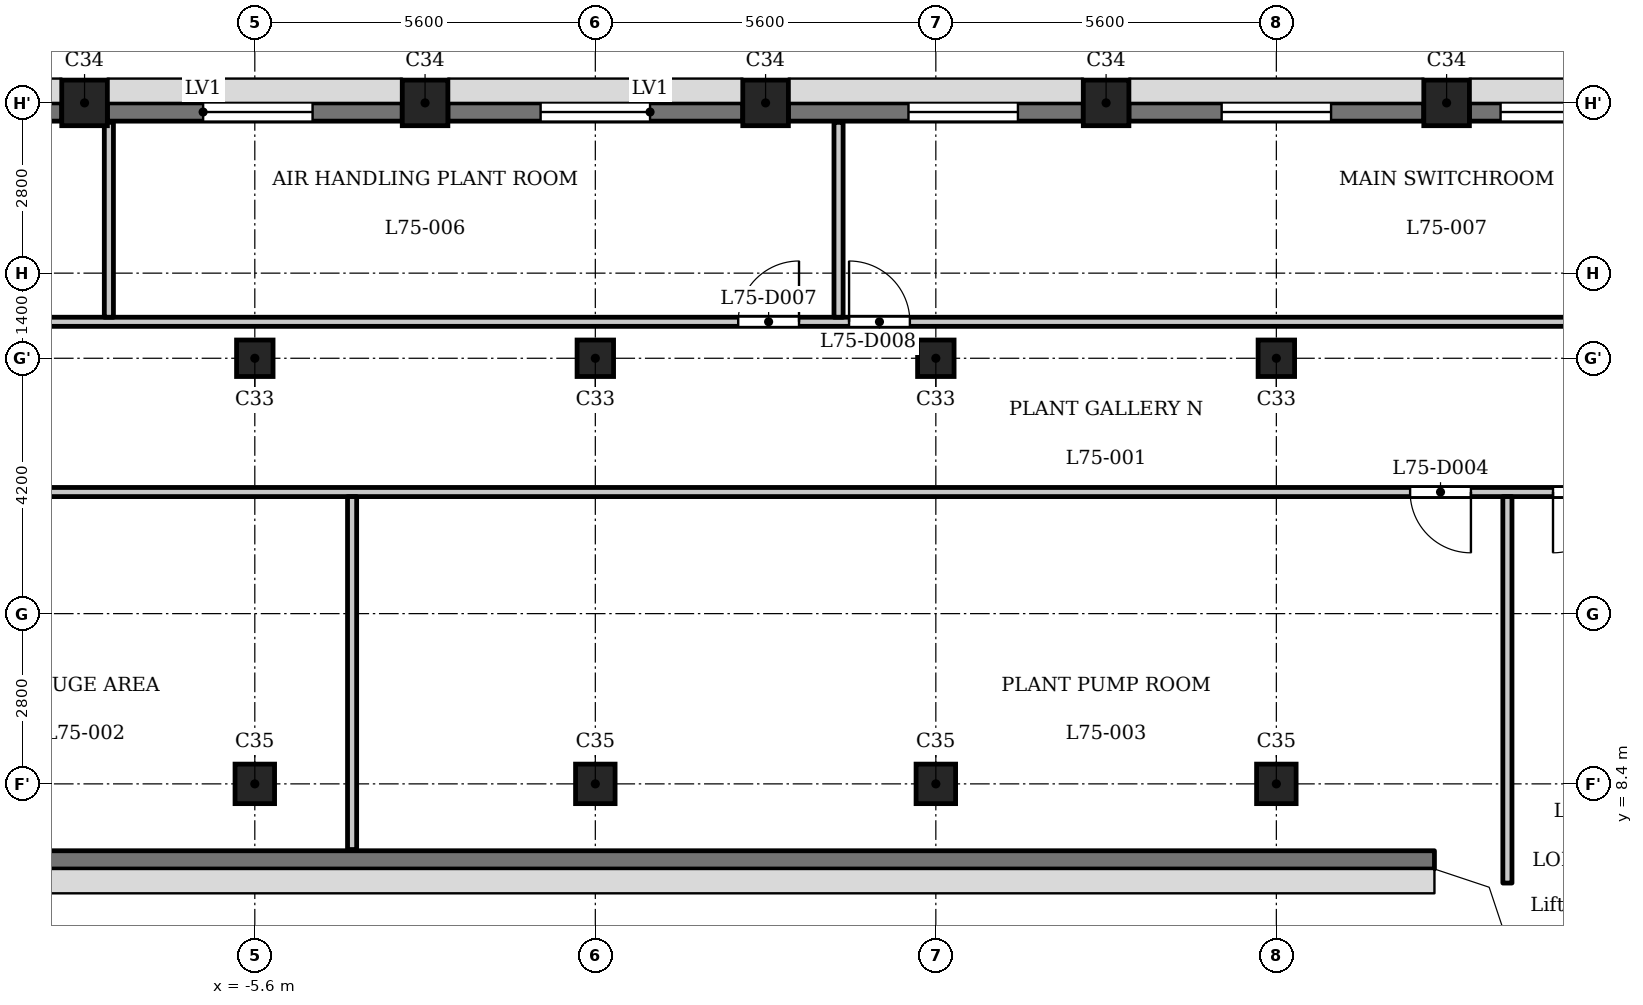
"""IFC4 building model, lengths in metres.
Left out: names, types, materials, properties, quantities, classifications, styles, units other than length and angle.
Written with IfcOpenShell. Run it as: python <this file> out.ifc"""

import sys

from ifc_helpers import new_model, si_unit, direction, frame, frame_2d, origin, origin_2d, place, context, subcontext, project, spatial, polyline, rectangle, outline, extrude, element, fill, save


model = new_model("IFC4")
c1 = context("Model", 3, precision=1e-05, world=origin(), true_north=direction((0.0, 1.0)))
c2 = subcontext(c1, "Body", "Model", "MODEL_VIEW")
j1 = project(units=[si_unit("LENGTHUNIT", "METRE"), si_unit("PLANEANGLEUNIT", "RADIAN")], contexts=[c1])
p1 = place(None, origin())
s1 = spatial("IfcSite", under=j1, at=p1, CompositionType="ELEMENT")
p2 = place(p1, origin())
s2 = spatial("IfcBuilding", under=s1, at=p2, CompositionType="ELEMENT")
p3 = place(p2, frame((0.0, 0.0, 289.1)))
s3 = spatial("IfcBuildingStorey", under=s2, at=p3, CompositionType="ELEMENT", Elevation=289.1)
for number, where, z_axis, x_axis in (
    (1, (14.0, 19.6, 0.0), (0.0, 0.0, 1.0), (1.0, 0.0, 0.0)),
    (2, (8.4, 19.6, 0.0), (0.0, 0.0, 1.0), (1.0, 0.0, 0.0)),
    (3, (2.8, 19.6, 0.0), (0.0, 0.0, 1.0), (1.0, 0.0, 0.0)),
    (4, (-2.8, 19.6, 0.0), (0.0, 0.0, 1.0), (1.0, 0.0, 0.0)),
    (5, (-8.4, 19.6, 0.0), (0.0, 0.0, 1.0), (1.0, 0.0, 0.0)),
):
    element("IfcColumn", number, at=place(p3, frame(where, z_axis=z_axis, x_axis=x_axis)), inside=s3, PredefinedType="COLUMN", context=c2, shape_type="SweptSolid", body=[
        extrude(rectangle(XDim=0.75, YDim=0.75, at=origin_2d()), origin(), (0.0, 0.0, 1.0), 5.4),
    ])
for number, where, z_axis, x_axis in (
    (6, (-5.6, 8.4, 0.0), (0.0, 0.0, 1.0), (1.0, 0.0, 0.0)),
    (7, (0.0, 8.4, 0.0), (0.0, 0.0, 1.0), (1.0, 0.0, 0.0)),
    (8, (5.6, 8.4, 0.0), (0.0, 0.0, 1.0), (1.0, 0.0, 0.0)),
    (9, (11.2, 8.4, 0.0), (0.0, 0.0, 1.0), (1.0, 0.0, 0.0)),
):
    element("IfcColumn", number, at=place(p3, frame(where, z_axis=z_axis, x_axis=x_axis)), inside=s3, PredefinedType="COLUMN", context=c2, shape_type="SweptSolid", body=[
        extrude(rectangle(XDim=0.65, YDim=0.65, at=origin_2d()), origin(), (0.0, 0.0, 1.0), 5.4),
    ])
for number, where, z_axis, x_axis in (
    (10, (-5.6, 15.4, 0.0), (0.0, 0.0, 1.0), (1.0, 0.0, 0.0)),
    (11, (0.0, 15.4, 0.0), (0.0, 0.0, 1.0), (1.0, 0.0, 0.0)),
    (12, (5.6, 15.4, 0.0), (0.0, 0.0, 1.0), (1.0, 0.0, 0.0)),
    (13, (11.2, 15.4, 0.0), (0.0, 0.0, 1.0), (1.0, 0.0, 0.0)),
):
    element("IfcColumn", number, at=place(p3, frame(where, z_axis=z_axis, x_axis=x_axis)), inside=s3, PredefinedType="COLUMN", context=c2, shape_type="SweptSolid", body=[
        extrude(rectangle(XDim=0.6, YDim=0.6, at=origin_2d()), origin(), (0.0, 0.0, 1.0), 5.4),
    ])
p4 = place(p3, frame((17.2, 19.45, 0.0), z_axis=(0.0, 0.0, 1.0), x_axis=(-1.0, 0.0, 0.0)))
e14 = element("IfcWall", 14, at=p4, inside=s3, PredefinedType="SOLIDWALL", context=c2, shape_type="SweptSolid", body=[
    extrude(rectangle(XDim=2.825, YDim=0.3, at=frame_2d((1.413, 0.0))), origin(), (0.0, 0.0, 1.0), 3.2),
])
p5 = place(p4, frame((0.512, 0.0, 0.9)))
e15 = element("IfcOpeningElement", 15, at=p5, cuts=e14, PredefinedType="OPENING", context=c2, shape_type="SweptSolid", body=[
    extrude(rectangle(XDim=1.8, YDim=1.5, at=frame_2d((0.9, 0.75))), frame((0.0, 0.16, 0.0), z_axis=(0.0, -1.0, 0.0), x_axis=(1.0, 0.0, 0.0)), (0.0, 0.0, 1.0), 0.32),
])
p6 = place(p3, frame((13.625, 19.45, 0.0), z_axis=(0.0, 0.0, 1.0), x_axis=(-1.0, 0.0, 0.0)))
e16 = element("IfcWall", 16, at=p6, inside=s3, PredefinedType="SOLIDWALL", context=c2, shape_type="SweptSolid", body=[
    extrude(rectangle(XDim=4.85, YDim=0.3, at=frame_2d((2.425, 0.0))), origin(), (0.0, 0.0, 1.0), 3.2),
])
p7 = place(p6, frame((1.525, 0.0, 0.9)))
e17 = element("IfcOpeningElement", 17, at=p7, cuts=e16, PredefinedType="OPENING", context=c2, shape_type="SweptSolid", body=[
    extrude(rectangle(XDim=1.8, YDim=1.5, at=frame_2d((0.9, 0.75))), frame((0.0, 0.16, 0.0), z_axis=(0.0, -1.0, 0.0), x_axis=(1.0, 0.0, 0.0)), (0.0, 0.0, 1.0), 0.32),
])
p8 = place(p3, frame((8.025, 19.45, 0.0), z_axis=(0.0, 0.0, 1.0), x_axis=(-1.0, 0.0, 0.0)))
e18 = element("IfcWall", 18, at=p8, inside=s3, PredefinedType="SOLIDWALL", context=c2, shape_type="SweptSolid", body=[
    extrude(rectangle(XDim=4.85, YDim=0.3, at=frame_2d((2.425, 0.0))), origin(), (0.0, 0.0, 1.0), 3.2),
])
p9 = place(p8, frame((1.075, 0.0, 0.9)))
e19 = element("IfcOpeningElement", 19, at=p9, cuts=e18, PredefinedType="OPENING", context=c2, shape_type="SweptSolid", body=[
    extrude(rectangle(XDim=1.8, YDim=1.5, at=frame_2d((0.9, 0.75))), frame((0.0, 0.16, 0.0), z_axis=(0.0, -1.0, 0.0), x_axis=(1.0, 0.0, 0.0)), (0.0, 0.0, 1.0), 0.32),
])
p10 = place(p3, frame((2.425, 19.45, 0.0), z_axis=(0.0, 0.0, 1.0), x_axis=(-1.0, 0.0, 0.0)))
e20 = element("IfcWall", 20, at=p10, inside=s3, PredefinedType="SOLIDWALL", context=c2, shape_type="SweptSolid", body=[
    extrude(rectangle(XDim=4.85, YDim=0.3, at=frame_2d((2.425, 0.0))), origin(), (0.0, 0.0, 1.0), 3.2),
])
p11 = place(p10, frame((1.525, 0.0, 0.9)))
e21 = element("IfcOpeningElement", 21, at=p11, cuts=e20, PredefinedType="OPENING", context=c2, shape_type="SweptSolid", body=[
    extrude(rectangle(XDim=1.8, YDim=1.5, at=frame_2d((0.9, 0.75))), frame((0.0, 0.16, 0.0), z_axis=(0.0, -1.0, 0.0), x_axis=(1.0, 0.0, 0.0)), (0.0, 0.0, 1.0), 0.32),
])
p12 = place(p3, frame((-3.175, 19.45, 0.0), z_axis=(0.0, 0.0, 1.0), x_axis=(-1.0, 0.0, 0.0)))
e22 = element("IfcWall", 22, at=p12, inside=s3, PredefinedType="SOLIDWALL", context=c2, shape_type="SweptSolid", body=[
    extrude(rectangle(XDim=4.85, YDim=0.3, at=frame_2d((2.425, 0.0))), origin(), (0.0, 0.0, 1.0), 3.2),
])
p13 = place(p12, frame((1.475, 0.0, 0.9)))
e23 = element("IfcOpeningElement", 23, at=p13, cuts=e22, PredefinedType="OPENING", context=c2, shape_type="SweptSolid", body=[
    extrude(rectangle(XDim=1.8, YDim=1.5, at=frame_2d((0.9, 0.75))), frame((0.0, 0.16, 0.0), z_axis=(0.0, -1.0, 0.0), x_axis=(1.0, 0.0, 0.0)), (0.0, 0.0, 1.0), 0.32),
])
p14 = place(p3, frame((-8.775, 19.45, 0.0), z_axis=(0.0, 0.0, 1.0), x_axis=(-1.0, 0.0, 0.0)))
e24 = element("IfcWall", 24, at=p14, inside=s3, PredefinedType="SOLIDWALL", context=c2, shape_type="SweptSolid", body=[
    extrude(rectangle(XDim=4.85, YDim=0.3, at=frame_2d((2.425, 0.0))), origin(), (0.0, 0.0, 1.0), 3.2),
])
p15 = place(p14, frame((1.525, 0.0, 0.9)))
e25 = element("IfcOpeningElement", 25, at=p15, cuts=e24, PredefinedType="OPENING", context=c2, shape_type="SweptSolid", body=[
    extrude(rectangle(XDim=1.8, YDim=1.5, at=frame_2d((0.9, 0.75))), frame((0.0, 0.16, 0.0), z_axis=(0.0, -1.0, 0.0), x_axis=(1.0, 0.0, 0.0)), (0.0, 0.0, 1.0), 0.32),
])
p16 = place(p3, frame((-13.8, 7.15, 0.0), z_axis=(0.0, 0.0, 1.0), x_axis=(1.0, 0.0, 0.0)))
e26 = element("IfcWall", 26, at=p16, inside=s3, PredefinedType="SOLIDWALL", context=c2, shape_type="SweptSolid", body=[
    extrude(rectangle(XDim=27.6, YDim=0.3, at=frame_2d((13.8, 0.0))), origin(), (0.0, 0.0, 1.0), 5.0),
])
p17 = place(p3, frame((-17.4, 13.2, 0.0), z_axis=(0.0, 0.0, 1.0), x_axis=(1.0, 0.0, 0.0)))
e27 = element("IfcWall", 27, at=p17, inside=s3, PredefinedType="PARTITIONING", context=c2, shape_type="SweptSolid", body=[
    extrude(rectangle(XDim=34.8, YDim=0.15, at=frame_2d((17.4, 0.0))), origin(), (0.0, 0.0, 1.0), 5.0),
])
p18 = place(p17, frame((0.75, 0.0, 0.0)))
e28 = element("IfcOpeningElement", 28, at=p18, cuts=e27, PredefinedType="OPENING", context=c2, shape_type="SweptSolid", body=[
    extrude(rectangle(XDim=1.0, YDim=2.1, at=frame_2d((0.5, 1.05))), frame((0.0, 0.085, 0.0), z_axis=(0.0, -1.0, 0.0), x_axis=(1.0, 0.0, 0.0)), (0.0, 0.0, 1.0), 0.17),
])
p19 = place(p17, frame((33.15, 0.0, 0.0)))
e29 = element("IfcOpeningElement", 29, at=p19, cuts=e27, PredefinedType="OPENING", context=c2, shape_type="SweptSolid", body=[
    extrude(rectangle(XDim=1.0, YDim=2.1, at=frame_2d((0.5, 1.05))), frame((0.0, 0.085, 0.0), z_axis=(0.0, -1.0, 0.0), x_axis=(1.0, 0.0, 0.0)), (0.0, 0.0, 1.0), 0.17),
])
p20 = place(p17, frame((3.05, 0.0, 0.0)))
e30 = element("IfcOpeningElement", 30, at=p20, cuts=e27, PredefinedType="OPENING", context=c2, shape_type="SweptSolid", body=[
    extrude(rectangle(XDim=1.2, YDim=2.1, at=frame_2d((0.6, 1.05))), frame((0.0, 0.085, 0.0), z_axis=(0.0, -1.0, 0.0), x_axis=(1.0, 0.0, 0.0)), (0.0, 0.0, 1.0), 0.17),
])
p21 = place(p17, frame((30.8, 0.0, 0.0)))
e31 = element("IfcOpeningElement", 31, at=p21, cuts=e27, PredefinedType="OPENING", context=c2, shape_type="SweptSolid", body=[
    extrude(rectangle(XDim=1.0, YDim=2.1, at=frame_2d((0.5, 1.05))), frame((0.0, 0.085, 0.0), z_axis=(0.0, -1.0, 0.0), x_axis=(1.0, 0.0, 0.0)), (0.0, 0.0, 1.0), 0.17),
])
p22 = place(p3, frame((-22.756, 16.0, 0.0), z_axis=(0.0, 0.0, 1.0), x_axis=(1.0, 0.0, 0.0)))
e32 = element("IfcWall", 32, at=p22, inside=s3, PredefinedType="PARTITIONING", context=c2, shape_type="SweptSolid", body=[
    extrude(rectangle(XDim=45.511, YDim=0.15, at=frame_2d((22.756, 0.0))), origin(), (0.0, 0.0, 1.0), 5.0),
])
p23 = place(p22, frame((2.106, 0.0, 0.0)))
e33 = element("IfcOpeningElement", 33, at=p23, cuts=e32, PredefinedType="OPENING", context=c2, shape_type="SweptSolid", body=[
    extrude(rectangle(XDim=1.0, YDim=2.1, at=frame_2d((0.5, 1.05))), frame((0.0, 0.085, 0.0), z_axis=(0.0, -1.0, 0.0), x_axis=(1.0, 0.0, 0.0)), (0.0, 0.0, 1.0), 0.17),
])
p24 = place(p22, frame((4.356, 0.0, 0.0)))
e34 = element("IfcOpeningElement", 34, at=p24, cuts=e32, PredefinedType="OPENING", context=c2, shape_type="SweptSolid", body=[
    extrude(rectangle(XDim=1.0, YDim=2.1, at=frame_2d((0.5, 1.05))), frame((0.0, 0.085, 0.0), z_axis=(0.0, -1.0, 0.0), x_axis=(1.0, 0.0, 0.0)), (0.0, 0.0, 1.0), 0.17),
])
p25 = place(p22, frame((25.106, 0.0, 0.0)))
e35 = element("IfcOpeningElement", 35, at=p25, cuts=e32, PredefinedType="OPENING", context=c2, shape_type="SweptSolid", body=[
    extrude(rectangle(XDim=1.0, YDim=2.1, at=frame_2d((0.5, 1.05))), frame((0.0, 0.085, 0.0), z_axis=(0.0, -1.0, 0.0), x_axis=(1.0, 0.0, 0.0)), (0.0, 0.0, 1.0), 0.17),
])
p26 = place(p22, frame((26.929, 0.0, 0.0)))
e36 = element("IfcOpeningElement", 36, at=p26, cuts=e32, PredefinedType="OPENING", context=c2, shape_type="SweptSolid", body=[
    extrude(rectangle(XDim=1.0, YDim=2.1, at=frame_2d((0.5, 1.05))), frame((0.0, 0.085, 0.0), z_axis=(0.0, -1.0, 0.0), x_axis=(1.0, 0.0, 0.0)), (0.0, 0.0, 1.0), 0.17),
])
p27 = place(p3, frame((-8.0, 16.075, 0.0), z_axis=(0.0, 0.0, 1.0), x_axis=(0.0, 1.0, 0.0)))
e37 = element("IfcWall", 37, at=p27, inside=s3, PredefinedType="PARTITIONING", context=c2, shape_type="SweptSolid", body=[
    extrude(rectangle(XDim=3.205, YDim=0.15, at=frame_2d((1.603, 0.0))), origin(), (0.0, 0.0, 1.0), 5.0),
])
p28 = place(p3, frame((-4.0, 7.32, 0.0), z_axis=(0.0, 0.0, 1.0), x_axis=(0.0, 1.0, 0.0)))
e38 = element("IfcWall", 38, at=p28, inside=s3, PredefinedType="PARTITIONING", context=c2, shape_type="SweptSolid", body=[
    extrude(rectangle(XDim=5.805, YDim=0.15, at=frame_2d((2.902, 0.0))), origin(), (0.0, 0.0, 1.0), 5.0),
])
p29 = place(p3, frame((4.0, 16.075, 0.0), z_axis=(0.0, 0.0, 1.0), x_axis=(0.0, 1.0, 0.0)))
e39 = element("IfcWall", 39, at=p29, inside=s3, PredefinedType="PARTITIONING", context=c2, shape_type="SweptSolid", body=[
    extrude(rectangle(XDim=3.205, YDim=0.15, at=frame_2d((1.603, 0.0))), origin(), (0.0, 0.0, 1.0), 5.0),
])
p30 = place(p3, frame((15.0, 6.769, 0.0), z_axis=(0.0, 0.0, 1.0), x_axis=(0.0, 1.0, 0.0)))
e40 = element("IfcWall", 40, at=p30, inside=s3, PredefinedType="PARTITIONING", context=c2, shape_type="SweptSolid", body=[
    extrude(rectangle(XDim=6.356, YDim=0.15, at=frame_2d((3.178, 0.0))), origin(), (0.0, 0.0, 1.0), 5.0),
])
p31 = place(p3, origin())
e41 = element("IfcWall", 41, at=p31, inside=s3, PredefinedType="SOLIDWALL", context=c2, shape_type="SweptSolid", body=[
    extrude(outline(polyline([(14.937, 6.937), (13.849, 7.3), (13.8, 7.3), (13.8, 7.0), (14.7, 6.7), (15.0, 5.8), (15.3, 5.8), (15.3, 5.849), (14.937, 6.937)])), origin(), (0.0, 0.0, 1.0), 5.0),
])
p32 = place(p19, origin())
e42 = element("IfcDoor", 42, at=p32, inside=s3, OperationType="SINGLE_SWING_LEFT", PredefinedType="DOOR", context=c2, shape_type="SweptSolid", body=[
    extrude(rectangle(XDim=1.0, YDim=2.1, at=frame_2d((0.5, 1.05))), frame((0.0, 0.025, 0.0), z_axis=(0.0, -1.0, 0.0), x_axis=(1.0, 0.0, 0.0)), (0.0, 0.0, 1.0), 0.05),
])
fill(e29, e42)
p33 = place(p21, origin())
e43 = element("IfcDoor", 43, at=p33, inside=s3, OperationType="SINGLE_SWING_RIGHT", PredefinedType="DOOR", context=c2, shape_type="SweptSolid", body=[
    extrude(rectangle(XDim=1.0, YDim=2.1, at=frame_2d((0.5, 1.05))), frame((0.0, 0.025, 0.0), z_axis=(0.0, -1.0, 0.0), x_axis=(1.0, 0.0, 0.0)), (0.0, 0.0, 1.0), 0.05),
])
fill(e31, e43)
p34 = place(p25, origin())
e44 = element("IfcDoor", 44, at=p34, inside=s3, OperationType="SINGLE_SWING_LEFT", PredefinedType="DOOR", context=c2, shape_type="SweptSolid", body=[
    extrude(rectangle(XDim=1.0, YDim=2.1, at=frame_2d((0.5, 1.05))), frame((0.0, 0.025, 0.0), z_axis=(0.0, -1.0, 0.0), x_axis=(1.0, 0.0, 0.0)), (0.0, 0.0, 1.0), 0.05),
])
fill(e35, e44)
p35 = place(p26, origin())
e45 = element("IfcDoor", 45, at=p35, inside=s3, OperationType="SINGLE_SWING_RIGHT", PredefinedType="DOOR", context=c2, shape_type="SweptSolid", body=[
    extrude(rectangle(XDim=1.0, YDim=2.1, at=frame_2d((0.5, 1.05))), frame((0.0, 0.025, 0.0), z_axis=(0.0, -1.0, 0.0), x_axis=(1.0, 0.0, 0.0)), (0.0, 0.0, 1.0), 0.05),
])
fill(e36, e45)
p36 = place(p5, origin())
e46 = element("IfcWindow", 46, at=p36, inside=s3, PartitioningType="SINGLE_PANEL", PredefinedType="WINDOW", context=c2, shape_type="SweptSolid", body=[
    extrude(rectangle(XDim=1.8, YDim=1.5, at=frame_2d((0.9, 0.75))), frame((0.0, 0.03, 0.0), z_axis=(0.0, -1.0, 0.0), x_axis=(1.0, 0.0, 0.0)), (0.0, 0.0, 1.0), 0.06),
])
fill(e15, e46)
p37 = place(p7, origin())
e47 = element("IfcWindow", 47, at=p37, inside=s3, PartitioningType="SINGLE_PANEL", PredefinedType="WINDOW", context=c2, shape_type="SweptSolid", body=[
    extrude(rectangle(XDim=1.8, YDim=1.5, at=frame_2d((0.9, 0.75))), frame((0.0, 0.03, 0.0), z_axis=(0.0, -1.0, 0.0), x_axis=(1.0, 0.0, 0.0)), (0.0, 0.0, 1.0), 0.06),
])
fill(e17, e47)
p38 = place(p9, origin())
e48 = element("IfcWindow", 48, at=p38, inside=s3, PartitioningType="SINGLE_PANEL", PredefinedType="WINDOW", context=c2, shape_type="SweptSolid", body=[
    extrude(rectangle(XDim=1.8, YDim=1.5, at=frame_2d((0.9, 0.75))), frame((0.0, 0.03, 0.0), z_axis=(0.0, -1.0, 0.0), x_axis=(1.0, 0.0, 0.0)), (0.0, 0.0, 1.0), 0.06),
])
fill(e19, e48)
p39 = place(p11, origin())
e49 = element("IfcWindow", 49, at=p39, inside=s3, PartitioningType="SINGLE_PANEL", PredefinedType="WINDOW", context=c2, shape_type="SweptSolid", body=[
    extrude(rectangle(XDim=1.8, YDim=1.5, at=frame_2d((0.9, 0.75))), frame((0.0, 0.03, 0.0), z_axis=(0.0, -1.0, 0.0), x_axis=(1.0, 0.0, 0.0)), (0.0, 0.0, 1.0), 0.06),
])
fill(e21, e49)
p40 = place(p13, origin())
e50 = element("IfcWindow", 50, at=p40, inside=s3, PartitioningType="SINGLE_PANEL", PredefinedType="WINDOW", context=c2, shape_type="SweptSolid", body=[
    extrude(rectangle(XDim=1.8, YDim=1.5, at=frame_2d((0.9, 0.75))), frame((0.0, 0.03, 0.0), z_axis=(0.0, -1.0, 0.0), x_axis=(1.0, 0.0, 0.0)), (0.0, 0.0, 1.0), 0.06),
])
fill(e23, e50)
save(model, sys.argv[1])
